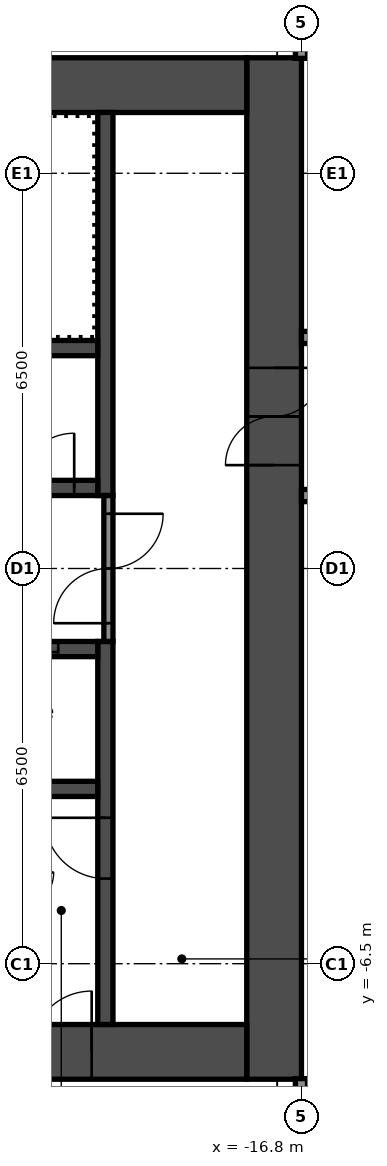
"""IFC4 building model, lengths in metres.
Left out: names, types, materials, properties, quantities, classifications, styles, units other than length and angle.
Written with IfcOpenShell. Run it as: python <this file> out.ifc"""

import sys

from ifc_helpers import new_model, si_unit, direction, frame, frame_2d, origin, place, context, subcontext, project, spatial, rectangle, extrude, element, fill, save


model = new_model("IFC4")
c1 = context("Model", 3, precision=1e-05, world=origin(), true_north=direction((0.0, 1.0)))
c2 = subcontext(c1, "Body", "Model", "MODEL_VIEW")
j1 = project(units=[si_unit("LENGTHUNIT", "METRE"), si_unit("PLANEANGLEUNIT", "RADIAN")], contexts=[c1])
p1 = place(None, origin())
s1 = spatial("IfcSite", under=j1, at=p1, CompositionType="ELEMENT")
p2 = place(p1, origin())
s2 = spatial("IfcBuilding", under=s1, at=p2, CompositionType="ELEMENT")
p3 = place(p2, frame((0.0, 0.0, 175.8)))
s3 = spatial("IfcBuildingStorey", under=s2, at=p3, CompositionType="ELEMENT", Elevation=175.8)
p4 = place(p3, frame((-17.25, -8.4, 0.0), z_axis=(0.0, 0.0, 1.0), x_axis=(0.0, 1.0, 0.0)))
e1 = element("IfcWall", 1, at=p4, inside=s3, PredefinedType="SHEAR", context=c2, shape_type="SweptSolid", body=[
    extrude(rectangle(XDim=16.8, YDim=0.9, at=frame_2d((8.4, 0.0))), origin(), (0.0, 0.0, 1.0), 4.1),
])
p5 = place(p4, frame((10.1, 0.0, 0.0)))
e2 = element("IfcOpeningElement", 2, at=p5, cuts=e1, PredefinedType="OPENING", context=c2, shape_type="SweptSolid", body=[
    extrude(rectangle(XDim=1.6, YDim=2.1, at=frame_2d((0.8, 1.05))), frame((0.0, 0.46, 0.0), z_axis=(0.0, -1.0, 0.0), x_axis=(1.0, 0.0, 0.0)), (0.0, 0.0, 1.0), 0.92),
])
p6 = place(p3, frame((-32.7, 7.95, 0.0), z_axis=(0.0, 0.0, 1.0), x_axis=(1.0, 0.0, 0.0)))
e3 = element("IfcWall", 3, at=p6, inside=s3, PredefinedType="SHEAR", context=c2, shape_type="SweptSolid", body=[
    extrude(rectangle(XDim=15.0, YDim=0.9, at=frame_2d((7.5, 0.0))), origin(), (0.0, 0.0, 1.0), 4.1),
])
p7 = place(p6, frame((3.4, 0.0, 0.0)))
e4 = element("IfcOpeningElement", 4, at=p7, cuts=e3, PredefinedType="OPENING", context=c2, shape_type="SweptSolid", body=[
    extrude(rectangle(XDim=1.2, YDim=2.1, at=frame_2d((0.6, 1.05))), frame((0.0, 0.46, 0.0), z_axis=(0.0, -1.0, 0.0), x_axis=(1.0, 0.0, 0.0)), (0.0, 0.0, 1.0), 0.92),
])
p8 = place(p6, frame((0.75, 0.0, 0.0)))
e5 = element("IfcOpeningElement", 5, at=p8, cuts=e3, PredefinedType="OPENING", context=c2, shape_type="SweptSolid", body=[
    extrude(rectangle(XDim=0.9, YDim=2.1, at=frame_2d((0.45, 1.05))), frame((0.0, 0.46, 0.0), z_axis=(0.0, -1.0, 0.0), x_axis=(1.0, 0.0, 0.0)), (0.0, 0.0, 1.0), 0.92),
])
p9 = place(p3, frame((-32.7, -7.95, 0.0), z_axis=(0.0, 0.0, 1.0), x_axis=(1.0, 0.0, 0.0)))
e6 = element("IfcWall", 6, at=p9, inside=s3, PredefinedType="SHEAR", context=c2, shape_type="SweptSolid", body=[
    extrude(rectangle(XDim=15.0, YDim=0.9, at=frame_2d((7.5, 0.0))), origin(), (0.0, 0.0, 1.0), 4.1),
])
p10 = place(p9, frame((11.45, 0.0, 0.0)))
e7 = element("IfcOpeningElement", 7, at=p10, cuts=e6, PredefinedType="OPENING", context=c2, shape_type="SweptSolid", body=[
    extrude(rectangle(XDim=1.0, YDim=2.1, at=frame_2d((0.5, 1.05))), frame((0.0, 0.46, 0.0), z_axis=(0.0, -1.0, 0.0), x_axis=(1.0, 0.0, 0.0)), (0.0, 0.0, 1.0), 0.92),
])
p11 = place(p3, frame((-20.025, 1.2, 0.0), z_axis=(0.0, 0.0, 1.0), x_axis=(0.0, 1.0, 0.0)))
e8 = element("IfcWall", 8, at=p11, inside=s3, PredefinedType="SHEAR", context=c2, shape_type="SweptSolid", body=[
    extrude(rectangle(XDim=6.3, YDim=0.25, at=frame_2d((3.15, 0.0))), origin(), (0.0, 0.0, 1.0), 4.1),
])
p12 = place(p3, frame((-20.025, -7.5, 0.0), z_axis=(0.0, 0.0, 1.0), x_axis=(0.0, 1.0, 0.0)))
e9 = element("IfcWall", 9, at=p12, inside=s3, PredefinedType="SHEAR", context=c2, shape_type="SweptSolid", body=[
    extrude(rectangle(XDim=6.3, YDim=0.25, at=frame_2d((3.15, 0.0))), origin(), (0.0, 0.0, 1.0), 4.1),
])
p13 = place(p12, frame((2.4, 0.0, 0.0)))
e10 = element("IfcOpeningElement", 10, at=p13, cuts=e9, PredefinedType="OPENING", context=c2, shape_type="SweptSolid", body=[
    extrude(rectangle(XDim=1.0, YDim=2.1, at=frame_2d((0.5, 1.05))), frame((0.0, 0.135, 0.0), z_axis=(0.0, -1.0, 0.0), x_axis=(1.0, 0.0, 0.0)), (0.0, 0.0, 1.0), 0.27),
])
p14 = place(p3, frame((-27.65, 1.325, 0.0), z_axis=(0.0, 0.0, 1.0), x_axis=(1.0, 0.0, 0.0)))
e11 = element("IfcWall", 11, at=p14, inside=s3, PredefinedType="SHEAR", context=c2, shape_type="SweptSolid", body=[
    extrude(rectangle(XDim=7.5, YDim=0.25, at=frame_2d((3.75, 0.0))), origin(), (0.0, 0.0, 1.0), 4.1),
])
p15 = place(p14, frame((6.212, 0.0, 0.0)))
e12 = element("IfcOpeningElement", 12, at=p15, cuts=e11, PredefinedType="OPENING", context=c2, shape_type="SweptSolid", body=[
    extrude(rectangle(XDim=0.9, YDim=2.1, at=frame_2d((0.45, 1.05))), frame((0.0, 0.135, 0.0), z_axis=(0.0, -1.0, 0.0), x_axis=(1.0, 0.0, 0.0)), (0.0, 0.0, 1.0), 0.27),
])
p16 = place(p14, frame((2.512, 0.0, 0.0)))
e13 = element("IfcOpeningElement", 13, at=p16, cuts=e11, PredefinedType="OPENING", context=c2, shape_type="SweptSolid", body=[
    extrude(rectangle(XDim=0.9, YDim=2.1, at=frame_2d((0.45, 1.05))), frame((0.0, 0.135, 0.0), z_axis=(0.0, -1.0, 0.0), x_axis=(1.0, 0.0, 0.0)), (0.0, 0.0, 1.0), 0.27),
])
p17 = place(p3, frame((-27.65, 3.625, 0.0), z_axis=(0.0, 0.0, 1.0), x_axis=(1.0, 0.0, 0.0)))
e14 = element("IfcWall", 14, at=p17, inside=s3, PredefinedType="SHEAR", context=c2, shape_type="SweptSolid", body=[
    extrude(rectangle(XDim=7.5, YDim=0.25, at=frame_2d((3.75, 0.0))), origin(), (0.0, 0.0, 1.0), 4.1),
])
p18 = place(p3, frame((-27.65, -1.325, 0.0), z_axis=(0.0, 0.0, 1.0), x_axis=(1.0, 0.0, 0.0)))
e15 = element("IfcWall", 15, at=p18, inside=s3, PredefinedType="SHEAR", context=c2, shape_type="SweptSolid", body=[
    extrude(rectangle(XDim=7.5, YDim=0.25, at=frame_2d((3.75, 0.0))), origin(), (0.0, 0.0, 1.0), 4.1),
])
p19 = place(p18, frame((5.75, 0.0, 0.0)))
e16 = element("IfcOpeningElement", 16, at=p19, cuts=e15, PredefinedType="OPENING", context=c2, shape_type="SweptSolid", body=[
    extrude(rectangle(XDim=1.1, YDim=2.1, at=frame_2d((0.55, 1.05))), frame((0.0, 0.135, 0.0), z_axis=(0.0, -1.0, 0.0), x_axis=(1.0, 0.0, 0.0)), (0.0, 0.0, 1.0), 0.27),
])
p20 = place(p18, frame((3.35, 0.0, 0.0)))
e17 = element("IfcOpeningElement", 17, at=p20, cuts=e15, PredefinedType="OPENING", context=c2, shape_type="SweptSolid", body=[
    extrude(rectangle(XDim=1.1, YDim=2.1, at=frame_2d((0.55, 1.05))), frame((0.0, 0.135, 0.0), z_axis=(0.0, -1.0, 0.0), x_axis=(1.0, 0.0, 0.0)), (0.0, 0.0, 1.0), 0.27),
])
p21 = place(p18, frame((0.95, 0.0, 0.0)))
e18 = element("IfcOpeningElement", 18, at=p21, cuts=e15, PredefinedType="OPENING", context=c2, shape_type="SweptSolid", body=[
    extrude(rectangle(XDim=1.1, YDim=2.1, at=frame_2d((0.55, 1.05))), frame((0.0, 0.135, 0.0), z_axis=(0.0, -1.0, 0.0), x_axis=(1.0, 0.0, 0.0)), (0.0, 0.0, 1.0), 0.27),
])
p22 = place(p3, frame((-27.65, -3.625, 0.0), z_axis=(0.0, 0.0, 1.0), x_axis=(1.0, 0.0, 0.0)))
e19 = element("IfcWall", 19, at=p22, inside=s3, PredefinedType="SHEAR", context=c2, shape_type="SweptSolid", body=[
    extrude(rectangle(XDim=7.5, YDim=0.25, at=frame_2d((3.75, 0.0))), origin(), (0.0, 0.0, 1.0), 4.1),
])
p23 = place(p3, frame((-19.975, -1.2, 0.0), z_axis=(0.0, 0.0, 1.0), x_axis=(0.0, 1.0, 0.0)))
e20 = element("IfcWall", 20, at=p23, inside=s3, PredefinedType="PARTITIONING", context=c2, shape_type="SweptSolid", body=[
    extrude(rectangle(XDim=2.4, YDim=0.15, at=frame_2d((1.2, 0.0))), origin(), (0.0, 0.0, 1.0), 4.1),
])
p24 = place(p23, frame((0.3, 0.0, 0.0)))
e21 = element("IfcOpeningElement", 21, at=p24, cuts=e20, PredefinedType="OPENING", context=c2, shape_type="SweptSolid", body=[
    extrude(rectangle(XDim=1.8, YDim=2.1, at=frame_2d((0.9, 1.05))), frame((0.0, 0.085, 0.0), z_axis=(0.0, -1.0, 0.0), x_axis=(1.0, 0.0, 0.0)), (0.0, 0.0, 1.0), 0.17),
])
p25 = place(p3, frame((-16.8, 1.2, 0.0), z_axis=(0.0, 0.0, 1.0), x_axis=(1.0, 0.0, 0.0)))
e22 = element("IfcWall", 22, at=p25, inside=s3, PredefinedType="PARTITIONING", context=c2, shape_type="SweptSolid", body=[
    extrude(rectangle(XDim=33.6, YDim=0.2, at=frame_2d((16.8, 0.0))), origin(), (0.0, 0.0, 1.0), 4.1),
])
p26 = place(p25, frame((3.75, 0.0, 0.0)))
e23 = element("IfcOpeningElement", 23, at=p26, cuts=e22, PredefinedType="OPENING", context=c2, shape_type="SweptSolid", body=[
    extrude(rectangle(XDim=0.9, YDim=2.1, at=frame_2d((0.45, 1.05))), frame((0.0, 0.11, 0.0), z_axis=(0.0, -1.0, 0.0), x_axis=(1.0, 0.0, 0.0)), (0.0, 0.0, 1.0), 0.22),
])
p27 = place(p25, frame((11.8, 0.0, 0.0)))
e24 = element("IfcOpeningElement", 24, at=p27, cuts=e22, PredefinedType="OPENING", context=c2, shape_type="SweptSolid", body=[
    extrude(rectangle(XDim=1.6, YDim=2.1, at=frame_2d((0.8, 1.05))), frame((0.0, 0.11, 0.0), z_axis=(0.0, -1.0, 0.0), x_axis=(1.0, 0.0, 0.0)), (0.0, 0.0, 1.0), 0.22),
])
p28 = place(p25, frame((20.55, 0.0, 0.0)))
e25 = element("IfcOpeningElement", 25, at=p28, cuts=e22, PredefinedType="OPENING", context=c2, shape_type="SweptSolid", body=[
    extrude(rectangle(XDim=0.9, YDim=2.1, at=frame_2d((0.45, 1.05))), frame((0.0, 0.11, 0.0), z_axis=(0.0, -1.0, 0.0), x_axis=(1.0, 0.0, 0.0)), (0.0, 0.0, 1.0), 0.22),
])
p29 = place(p25, frame((28.95, 0.0, 0.0)))
e26 = element("IfcOpeningElement", 26, at=p29, cuts=e22, PredefinedType="OPENING", context=c2, shape_type="SweptSolid", body=[
    extrude(rectangle(XDim=0.9, YDim=2.1, at=frame_2d((0.45, 1.05))), frame((0.0, 0.11, 0.0), z_axis=(0.0, -1.0, 0.0), x_axis=(1.0, 0.0, 0.0)), (0.0, 0.0, 1.0), 0.22),
])
p30 = place(p3, frame((-16.8, 3.8, 0.0), z_axis=(0.0, 0.0, 1.0), x_axis=(1.0, 0.0, 0.0)))
e27 = element("IfcWall", 27, at=p30, inside=s3, PredefinedType="PARTITIONING", context=c2, shape_type="SweptSolid", body=[
    extrude(rectangle(XDim=33.6, YDim=0.2, at=frame_2d((16.8, 0.0))), origin(), (0.0, 0.0, 1.0), 4.1),
])
p31 = place(p30, frame((3.75, 0.0, 0.0)))
e28 = element("IfcOpeningElement", 28, at=p31, cuts=e27, PredefinedType="OPENING", context=c2, shape_type="SweptSolid", body=[
    extrude(rectangle(XDim=0.9, YDim=2.1, at=frame_2d((0.45, 1.05))), frame((0.0, 0.11, 0.0), z_axis=(0.0, -1.0, 0.0), x_axis=(1.0, 0.0, 0.0)), (0.0, 0.0, 1.0), 0.22),
])
p32 = place(p30, frame((11.8, 0.0, 0.0)))
e29 = element("IfcOpeningElement", 29, at=p32, cuts=e27, PredefinedType="OPENING", context=c2, shape_type="SweptSolid", body=[
    extrude(rectangle(XDim=1.6, YDim=2.1, at=frame_2d((0.8, 1.05))), frame((0.0, 0.11, 0.0), z_axis=(0.0, -1.0, 0.0), x_axis=(1.0, 0.0, 0.0)), (0.0, 0.0, 1.0), 0.22),
])
p33 = place(p30, frame((20.55, 0.0, 0.0)))
e30 = element("IfcOpeningElement", 30, at=p33, cuts=e27, PredefinedType="OPENING", context=c2, shape_type="SweptSolid", body=[
    extrude(rectangle(XDim=0.9, YDim=2.1, at=frame_2d((0.45, 1.05))), frame((0.0, 0.11, 0.0), z_axis=(0.0, -1.0, 0.0), x_axis=(1.0, 0.0, 0.0)), (0.0, 0.0, 1.0), 0.22),
])
p34 = place(p30, frame((28.95, 0.0, 0.0)))
e31 = element("IfcOpeningElement", 31, at=p34, cuts=e27, PredefinedType="OPENING", context=c2, shape_type="SweptSolid", body=[
    extrude(rectangle(XDim=0.9, YDim=2.1, at=frame_2d((0.45, 1.05))), frame((0.0, 0.11, 0.0), z_axis=(0.0, -1.0, 0.0), x_axis=(1.0, 0.0, 0.0)), (0.0, 0.0, 1.0), 0.22),
])
p35 = place(p3, frame((-16.8, -19.3, 0.0), z_axis=(0.0, 0.0, 1.0), x_axis=(0.0, 1.0, 0.0)))
e32 = element("IfcWall", 32, at=p35, inside=s3, PredefinedType="PARTITIONING", context=c2, shape_type="SweptSolid", body=[
    extrude(rectangle(XDim=10.91, YDim=0.2, at=frame_2d((5.455, 0.0))), origin(), (0.0, 0.0, 1.0), 4.1),
])
p36 = place(p3, frame((-16.8, 8.39, 0.0), z_axis=(0.0, 0.0, 1.0), x_axis=(0.0, 1.0, 0.0)))
e33 = element("IfcWall", 33, at=p36, inside=s3, PredefinedType="PARTITIONING", context=c2, shape_type="SweptSolid", body=[
    extrude(rectangle(XDim=12.16, YDim=0.2, at=frame_2d((6.08, 0.0))), origin(), (0.0, 0.0, 1.0), 4.1),
])
p37 = place(p5, origin())
e34 = element("IfcDoor", 34, at=p37, inside=s3, OperationType="DOUBLE_DOOR_SINGLE_SWING", PredefinedType="DOOR", context=c2, shape_type="SweptSolid", body=[
    extrude(rectangle(XDim=1.6, YDim=2.1, at=frame_2d((0.8, 1.05))), frame((0.0, 0.025, 0.0), z_axis=(0.0, -1.0, 0.0), x_axis=(1.0, 0.0, 0.0)), (0.0, 0.0, 1.0), 0.05),
])
fill(e2, e34)
p38 = place(p10, origin())
e35 = element("IfcDoor", 35, at=p38, inside=s3, OperationType="SINGLE_SWING_LEFT", PredefinedType="DOOR", context=c2, shape_type="SweptSolid", body=[
    extrude(rectangle(XDim=1.0, YDim=2.1, at=frame_2d((0.5, 1.05))), frame((0.0, 0.025, 0.0), z_axis=(0.0, -1.0, 0.0), x_axis=(1.0, 0.0, 0.0)), (0.0, 0.0, 1.0), 0.05),
])
fill(e7, e35)
p39 = place(p13, origin())
e36 = element("IfcDoor", 36, at=p39, inside=s3, OperationType="SINGLE_SWING_LEFT", PredefinedType="DOOR", context=c2, shape_type="SweptSolid", body=[
    extrude(rectangle(XDim=1.0, YDim=2.1, at=frame_2d((0.5, 1.05))), frame((0.0, 0.025, 0.0), z_axis=(0.0, -1.0, 0.0), x_axis=(1.0, 0.0, 0.0)), (0.0, 0.0, 1.0), 0.05),
])
fill(e10, e36)
p40 = place(p24, origin())
e37 = element("IfcDoor", 37, at=p40, inside=s3, OperationType="DOUBLE_DOOR_SINGLE_SWING", PredefinedType="DOOR", context=c2, shape_type="SweptSolid", body=[
    extrude(rectangle(XDim=1.8, YDim=2.1, at=frame_2d((0.9, 1.05))), frame((0.0, 0.025, 0.0), z_axis=(0.0, -1.0, 0.0), x_axis=(1.0, 0.0, 0.0)), (0.0, 0.0, 1.0), 0.05),
])
fill(e21, e37)
p41 = place(p15, origin())
e38 = element("IfcDoor", 38, at=p41, inside=s3, OperationType="SINGLE_SWING_LEFT", PredefinedType="DOOR", context=c2, shape_type="SweptSolid", body=[
    extrude(rectangle(XDim=0.9, YDim=2.1, at=frame_2d((0.45, 1.05))), frame((0.0, 0.025, 0.0), z_axis=(0.0, -1.0, 0.0), x_axis=(1.0, 0.0, 0.0)), (0.0, 0.0, 1.0), 0.05),
])
fill(e12, e38)
p42 = place(p19, origin())
e39 = element("IfcDoor", 39, at=p42, inside=s3, OperationType="DOUBLE_DOOR_SLIDING", PredefinedType="DOOR", context=c2, shape_type="SweptSolid", body=[
    extrude(rectangle(XDim=1.1, YDim=2.1, at=frame_2d((0.55, 1.05))), frame((0.0, 0.025, 0.0), z_axis=(0.0, -1.0, 0.0), x_axis=(1.0, 0.0, 0.0)), (0.0, 0.0, 1.0), 0.05),
])
fill(e16, e39)
save(model, sys.argv[1])
